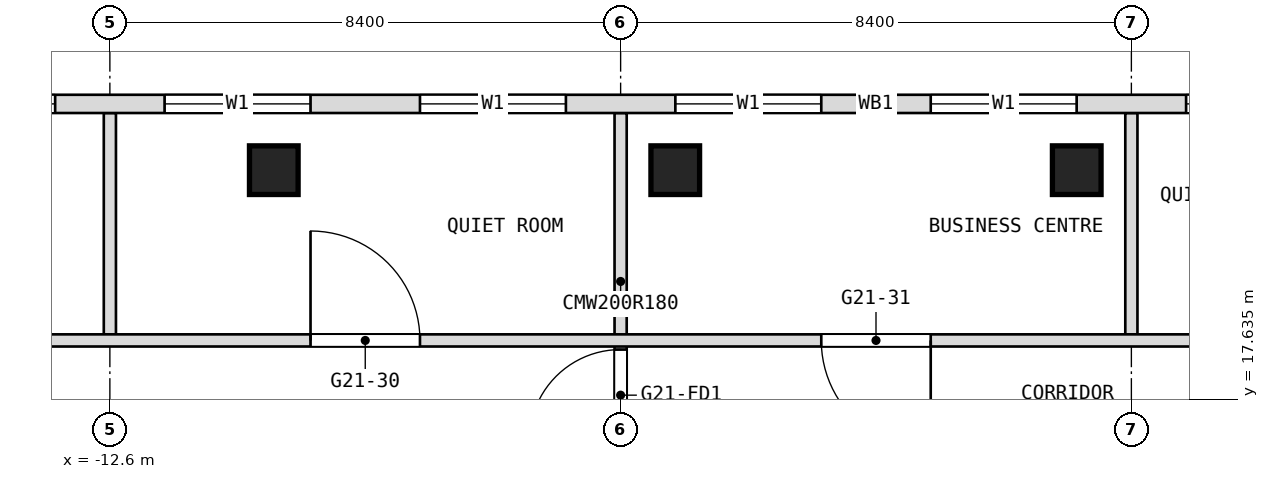
"""IFC4 building model, lengths in metres.
Left out: names, types, materials, properties, quantities, classifications, styles, units other than length and angle.
Written with IfcOpenShell. Run it as: python <this file> out.ifc"""

import sys

from ifc_helpers import new_model, si_unit, direction, frame, frame_2d, origin, origin_2d, place, context, subcontext, project, spatial, rectangle, extrude, element, fill, save


model = new_model("IFC4")
c1 = context("Model", 3, precision=1e-05, world=origin(), true_north=direction((0.0, 1.0)))
c2 = subcontext(c1, "Body", "Model", "MODEL_VIEW")
j1 = project(units=[si_unit("LENGTHUNIT", "METRE"), si_unit("PLANEANGLEUNIT", "RADIAN")], contexts=[c1])
p1 = place(None, origin())
s1 = spatial("IfcSite", under=j1, at=p1, CompositionType="ELEMENT")
p2 = place(p1, origin())
s2 = spatial("IfcBuilding", under=s1, at=p2, CompositionType="ELEMENT")
p3 = place(p2, frame((0.0, 0.0, 241.7)))
s3 = spatial("IfcBuildingStorey", under=s2, at=p3, CompositionType="ELEMENT", Elevation=241.7)
for number, where, z_axis, x_axis in (
    (1, (-9.904, 21.4, 0.0), (0.0, 0.0, 1.0), (1.0, 0.0, 0.0)),
    (2, (-3.302, 21.4, 0.0), (0.0, 0.0, 1.0), (1.0, 0.0, 0.0)),
    (3, (3.302, 21.4, 0.0), (0.0, 0.0, 1.0), (1.0, 0.0, 0.0)),
):
    element("IfcColumn", number, at=place(p3, frame(where, z_axis=z_axis, x_axis=x_axis)), inside=s3, PredefinedType="COLUMN", context=c2, shape_type="SweptSolid", body=[
        extrude(rectangle(XDim=0.8, YDim=0.8, at=origin_2d()), origin(), (0.0, 0.0, 1.0), 3.6),
    ])
p4 = place(p3, frame((4.2, 18.7, 0.0), z_axis=(0.0, 0.0, 1.0), x_axis=(0.0, 1.0, 0.0)))
e4 = element("IfcWall", 4, at=p4, inside=s3, PredefinedType="PARTITIONING", context=c2, shape_type="SweptSolid", body=[
    extrude(rectangle(XDim=3.64, YDim=0.2, at=frame_2d((1.82, 0.0))), origin(), (0.0, 0.0, 1.0), 3.34),
])
p5 = place(p3, frame((-4.2, 16.8, 0.0), z_axis=(0.0, 0.0, 1.0), x_axis=(0.0, 1.0, 0.0)))
e5 = element("IfcWall", 5, at=p5, inside=s3, PredefinedType="PARTITIONING", context=c2, shape_type="SweptSolid", body=[
    extrude(rectangle(XDim=5.54, YDim=0.2, at=frame_2d((2.77, 0.0))), origin(), (0.0, 0.0, 1.0), 3.34),
])
p6 = place(p5, frame((0.15, 0.0, 0.0)))
e6 = element("IfcOpeningElement", 6, at=p6, cuts=e5, PredefinedType="OPENING", context=c2, shape_type="SweptSolid", body=[
    extrude(rectangle(XDim=1.5, YDim=2.1, at=frame_2d((0.75, 1.05))), frame((0.0, 0.1, 0.0), z_axis=(0.0, -1.0, 0.0), x_axis=(1.0, 0.0, 0.0)), (0.0, 0.0, 1.0), 0.2),
])
p7 = place(p3, frame((-12.6, 18.7, 0.0), z_axis=(0.0, 0.0, 1.0), x_axis=(0.0, 1.0, 0.0)))
e7 = element("IfcWall", 7, at=p7, inside=s3, PredefinedType="PARTITIONING", context=c2, shape_type="SweptSolid", body=[
    extrude(rectangle(XDim=3.64, YDim=0.2, at=frame_2d((1.82, 0.0))), origin(), (0.0, 0.0, 1.0), 3.34),
])
p8 = place(p3, frame((-16.9, 18.6, 0.0), z_axis=(0.0, 0.0, 1.0), x_axis=(1.0, 0.0, 0.0)))
e8 = element("IfcWall", 8, at=p8, inside=s3, PredefinedType="PARTITIONING", context=c2, shape_type="SweptSolid", body=[
    extrude(rectangle(XDim=33.8, YDim=0.2, at=frame_2d((16.9, 0.0))), origin(), (0.0, 0.0, 1.0), 3.34),
])
p9 = place(p8, frame((1.7, 0.0, 0.0)))
e9 = element("IfcOpeningElement", 9, at=p9, cuts=e8, PredefinedType="OPENING", context=c2, shape_type="SweptSolid", body=[
    extrude(rectangle(XDim=1.0, YDim=2.1, at=frame_2d((0.5, 1.05))), frame((0.0, 0.1, 0.0), z_axis=(0.0, -1.0, 0.0), x_axis=(1.0, 0.0, 0.0)), (0.0, 0.0, 1.0), 0.2),
])
p10 = place(p8, frame((7.6, 0.0, 0.0)))
e10 = element("IfcOpeningElement", 10, at=p10, cuts=e8, PredefinedType="OPENING", context=c2, shape_type="SweptSolid", body=[
    extrude(rectangle(XDim=1.8, YDim=2.1, at=frame_2d((0.9, 1.05))), frame((0.0, 0.1, 0.0), z_axis=(0.0, -1.0, 0.0), x_axis=(1.0, 0.0, 0.0)), (0.0, 0.0, 1.0), 0.2),
])
p11 = place(p8, frame((16.0, 0.0, 0.0)))
e11 = element("IfcOpeningElement", 11, at=p11, cuts=e8, PredefinedType="OPENING", context=c2, shape_type="SweptSolid", body=[
    extrude(rectangle(XDim=1.8, YDim=2.1, at=frame_2d((0.9, 1.05))), frame((0.0, 0.1, 0.0), z_axis=(0.0, -1.0, 0.0), x_axis=(1.0, 0.0, 0.0)), (0.0, 0.0, 1.0), 0.2),
])
p12 = place(p8, frame((31.1, 0.0, 0.0)))
e12 = element("IfcOpeningElement", 12, at=p12, cuts=e8, PredefinedType="OPENING", context=c2, shape_type="SweptSolid", body=[
    extrude(rectangle(XDim=1.0, YDim=2.1, at=frame_2d((0.5, 1.05))), frame((0.0, 0.1, 0.0), z_axis=(0.0, -1.0, 0.0), x_axis=(1.0, 0.0, 0.0)), (0.0, 0.0, 1.0), 0.2),
])
p13 = place(p8, frame((22.7, 0.0, 0.0)))
e13 = element("IfcOpeningElement", 13, at=p13, cuts=e8, PredefinedType="OPENING", context=c2, shape_type="SweptSolid", body=[
    extrude(rectangle(XDim=1.0, YDim=2.1, at=frame_2d((0.5, 1.05))), frame((0.0, 0.1, 0.0), z_axis=(0.0, -1.0, 0.0), x_axis=(1.0, 0.0, 0.0)), (0.0, 0.0, 1.0), 0.2),
])
p14 = place(p8, frame((26.9, 0.0, 0.0)))
e14 = element("IfcOpeningElement", 14, at=p14, cuts=e8, PredefinedType="OPENING", context=c2, shape_type="SweptSolid", body=[
    extrude(rectangle(XDim=1.0, YDim=2.1, at=frame_2d((0.5, 1.05))), frame((0.0, 0.1, 0.0), z_axis=(0.0, -1.0, 0.0), x_axis=(1.0, 0.0, 0.0)), (0.0, 0.0, 1.0), 0.2),
])
p15 = place(p3, frame((19.206, 22.49, 0.0), z_axis=(0.0, 0.0, 1.0), x_axis=(-1.0, 0.0, 0.0)))
e15 = element("IfcWall", 15, at=p15, inside=s3, PredefinedType="NOTDEFINED", context=c2, shape_type="SweptSolid", body=[
    extrude(rectangle(XDim=38.412, YDim=0.3, at=frame_2d((19.206, 0.0))), origin(), (0.0, 0.0, 1.0), 3.6),
])
p16 = place(p15, frame((3.306, 0.0, 0.9)))
e16 = element("IfcOpeningElement", 16, at=p16, cuts=e15, PredefinedType="OPENING", context=c2, shape_type="SweptSolid", body=[
    extrude(rectangle(XDim=2.4, YDim=2.1, at=frame_2d((1.2, 1.05))), frame((0.0, 0.15, 0.0), z_axis=(0.0, -1.0, 0.0), x_axis=(1.0, 0.0, 0.0)), (0.0, 0.0, 1.0), 0.3),
])
p17 = place(p15, frame((7.506, 0.0, 0.9)))
e17 = element("IfcOpeningElement", 17, at=p17, cuts=e15, PredefinedType="OPENING", context=c2, shape_type="SweptSolid", body=[
    extrude(rectangle(XDim=2.4, YDim=2.1, at=frame_2d((1.2, 1.05))), frame((0.0, 0.15, 0.0), z_axis=(0.0, -1.0, 0.0), x_axis=(1.0, 0.0, 0.0)), (0.0, 0.0, 1.0), 0.3),
])
p18 = place(p15, frame((11.706, 0.0, 0.9)))
e18 = element("IfcOpeningElement", 18, at=p18, cuts=e15, PredefinedType="OPENING", context=c2, shape_type="SweptSolid", body=[
    extrude(rectangle(XDim=2.4, YDim=2.1, at=frame_2d((1.2, 1.05))), frame((0.0, 0.15, 0.0), z_axis=(0.0, -1.0, 0.0), x_axis=(1.0, 0.0, 0.0)), (0.0, 0.0, 1.0), 0.3),
])
p19 = place(p15, frame((15.906, 0.0, 0.9)))
e19 = element("IfcOpeningElement", 19, at=p19, cuts=e15, PredefinedType="OPENING", context=c2, shape_type="SweptSolid", body=[
    extrude(rectangle(XDim=2.4, YDim=2.1, at=frame_2d((1.2, 1.05))), frame((0.0, 0.15, 0.0), z_axis=(0.0, -1.0, 0.0), x_axis=(1.0, 0.0, 0.0)), (0.0, 0.0, 1.0), 0.3),
])
p20 = place(p15, frame((20.106, 0.0, 0.9)))
e20 = element("IfcOpeningElement", 20, at=p20, cuts=e15, PredefinedType="OPENING", context=c2, shape_type="SweptSolid", body=[
    extrude(rectangle(XDim=2.4, YDim=2.1, at=frame_2d((1.2, 1.05))), frame((0.0, 0.15, 0.0), z_axis=(0.0, -1.0, 0.0), x_axis=(1.0, 0.0, 0.0)), (0.0, 0.0, 1.0), 0.3),
])
p21 = place(p15, frame((24.306, 0.0, 0.9)))
e21 = element("IfcOpeningElement", 21, at=p21, cuts=e15, PredefinedType="OPENING", context=c2, shape_type="SweptSolid", body=[
    extrude(rectangle(XDim=2.4, YDim=2.1, at=frame_2d((1.2, 1.05))), frame((0.0, 0.15, 0.0), z_axis=(0.0, -1.0, 0.0), x_axis=(1.0, 0.0, 0.0)), (0.0, 0.0, 1.0), 0.3),
])
p22 = place(p15, frame((28.506, 0.0, 0.9)))
e22 = element("IfcOpeningElement", 22, at=p22, cuts=e15, PredefinedType="OPENING", context=c2, shape_type="SweptSolid", body=[
    extrude(rectangle(XDim=2.4, YDim=2.1, at=frame_2d((1.2, 1.05))), frame((0.0, 0.15, 0.0), z_axis=(0.0, -1.0, 0.0), x_axis=(1.0, 0.0, 0.0)), (0.0, 0.0, 1.0), 0.3),
])
p23 = place(p15, frame((32.706, 0.0, 0.9)))
e23 = element("IfcOpeningElement", 23, at=p23, cuts=e15, PredefinedType="OPENING", context=c2, shape_type="SweptSolid", body=[
    extrude(rectangle(XDim=2.4, YDim=2.1, at=frame_2d((1.2, 1.05))), frame((0.0, 0.15, 0.0), z_axis=(0.0, -1.0, 0.0), x_axis=(1.0, 0.0, 0.0)), (0.0, 0.0, 1.0), 0.3),
])
p24 = place(p10, origin())
e24 = element("IfcDoor", 24, at=p24, inside=s3, OperationType="DOUBLE_DOOR_SINGLE_SWING", PredefinedType="DOOR", context=c2, shape_type="SweptSolid", body=[
    extrude(rectangle(XDim=1.8, YDim=2.1, at=frame_2d((0.9, 1.05))), frame((0.0, 0.025, 0.0), z_axis=(0.0, -1.0, 0.0), x_axis=(1.0, 0.0, 0.0)), (0.0, 0.0, 1.0), 0.05),
])
fill(e10, e24)
p25 = place(p11, origin())
e25 = element("IfcDoor", 25, at=p25, inside=s3, OperationType="DOUBLE_DOOR_SINGLE_SWING", PredefinedType="DOOR", context=c2, shape_type="SweptSolid", body=[
    extrude(rectangle(XDim=1.8, YDim=2.1, at=frame_2d((0.9, 1.05))), frame((0.0, 0.025, 0.0), z_axis=(0.0, -1.0, 0.0), x_axis=(1.0, 0.0, 0.0)), (0.0, 0.0, 1.0), 0.05),
])
fill(e11, e25)
p26 = place(p18, origin())
e26 = element("IfcWindow", 26, at=p26, inside=s3, PartitioningType="SINGLE_PANEL", PredefinedType="WINDOW", context=c2, shape_type="SweptSolid", body=[
    extrude(rectangle(XDim=2.4, YDim=2.1, at=frame_2d((1.2, 1.05))), frame((0.0, 0.03, 0.0), z_axis=(0.0, -1.0, 0.0), x_axis=(1.0, 0.0, 0.0)), (0.0, 0.0, 1.0), 0.06),
])
fill(e18, e26)
p27 = place(p19, origin())
e27 = element("IfcWindow", 27, at=p27, inside=s3, PartitioningType="SINGLE_PANEL", PredefinedType="WINDOW", context=c2, shape_type="SweptSolid", body=[
    extrude(rectangle(XDim=2.4, YDim=2.1, at=frame_2d((1.2, 1.05))), frame((0.0, 0.03, 0.0), z_axis=(0.0, -1.0, 0.0), x_axis=(1.0, 0.0, 0.0)), (0.0, 0.0, 1.0), 0.06),
])
fill(e19, e27)
p28 = place(p20, origin())
e28 = element("IfcWindow", 28, at=p28, inside=s3, PartitioningType="SINGLE_PANEL", PredefinedType="WINDOW", context=c2, shape_type="SweptSolid", body=[
    extrude(rectangle(XDim=2.4, YDim=2.1, at=frame_2d((1.2, 1.05))), frame((0.0, 0.03, 0.0), z_axis=(0.0, -1.0, 0.0), x_axis=(1.0, 0.0, 0.0)), (0.0, 0.0, 1.0), 0.06),
])
fill(e20, e28)
p29 = place(p21, origin())
e29 = element("IfcWindow", 29, at=p29, inside=s3, PartitioningType="SINGLE_PANEL", PredefinedType="WINDOW", context=c2, shape_type="SweptSolid", body=[
    extrude(rectangle(XDim=2.4, YDim=2.1, at=frame_2d((1.2, 1.05))), frame((0.0, 0.03, 0.0), z_axis=(0.0, -1.0, 0.0), x_axis=(1.0, 0.0, 0.0)), (0.0, 0.0, 1.0), 0.06),
])
fill(e21, e29)
p30 = place(p22, origin())
e30 = element("IfcWindow", 30, at=p30, inside=s3, PartitioningType="SINGLE_PANEL", PredefinedType="WINDOW", context=c2, shape_type="SweptSolid", body=[
    extrude(rectangle(XDim=2.4, YDim=2.1, at=frame_2d((1.2, 1.05))), frame((0.0, 0.03, 0.0), z_axis=(0.0, -1.0, 0.0), x_axis=(1.0, 0.0, 0.0)), (0.0, 0.0, 1.0), 0.06),
])
fill(e22, e30)
p31 = place(p23, origin())
e31 = element("IfcWindow", 31, at=p31, inside=s3, PartitioningType="SINGLE_PANEL", PredefinedType="WINDOW", context=c2, shape_type="SweptSolid", body=[
    extrude(rectangle(XDim=2.4, YDim=2.1, at=frame_2d((1.2, 1.05))), frame((0.0, 0.03, 0.0), z_axis=(0.0, -1.0, 0.0), x_axis=(1.0, 0.0, 0.0)), (0.0, 0.0, 1.0), 0.06),
])
fill(e23, e31)
p32 = place(p6, origin())
e32 = element("IfcDoor", 32, at=p32, inside=s3, OperationType="DOUBLE_DOOR_DOUBLE_SWING", PredefinedType="DOOR", context=c2, shape_type="SweptSolid", body=[
    extrude(rectangle(XDim=1.5, YDim=2.1, at=frame_2d((0.75, 1.05))), frame((0.0, 0.025, 0.0), z_axis=(0.0, -1.0, 0.0), x_axis=(1.0, 0.0, 0.0)), (0.0, 0.0, 1.0), 0.05),
])
fill(e6, e32)
save(model, sys.argv[1])
